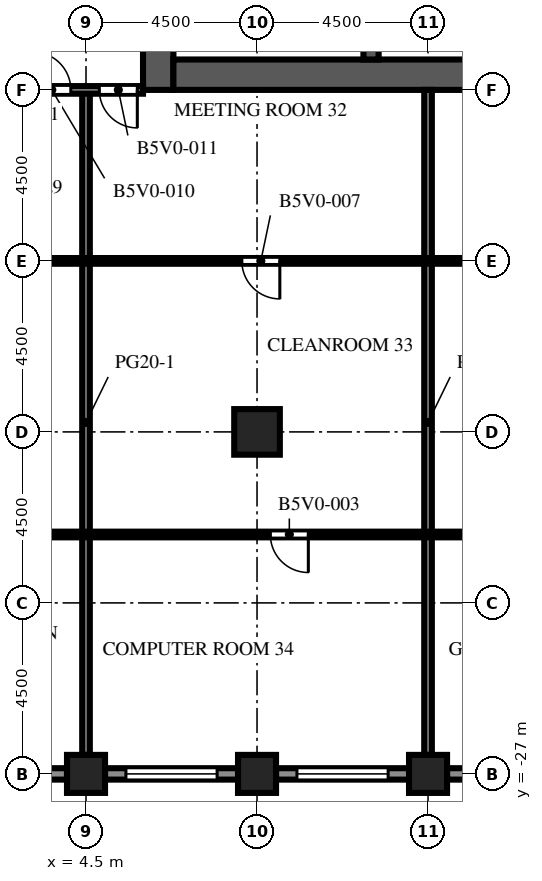
"""IFC4 building model, lengths in metres.
Left out: names, types, materials, properties, quantities, classifications, styles, units other than length and angle.
Written with IfcOpenShell. Run it as: python <this file> out.ifc"""

import sys

from ifc_helpers import new_model, si_unit, direction, frame, frame_2d, origin, origin_2d, place, context, subcontext, project, spatial, rectangle, extrude, element, fill, save


model = new_model("IFC4")
c1 = context("Model", 3, precision=1e-05, world=origin(), true_north=direction((0.0, 1.0)))
c2 = subcontext(c1, "Body", "Model", "MODEL_VIEW")
j1 = project(units=[si_unit("LENGTHUNIT", "METRE"), si_unit("PLANEANGLEUNIT", "RADIAN")], contexts=[c1])
p1 = place(None, origin())
s1 = spatial("IfcSite", under=j1, at=p1, CompositionType="ELEMENT")
p2 = place(p1, origin())
s2 = spatial("IfcBuilding", under=s1, at=p2, CompositionType="ELEMENT")
p3 = place(p2, frame((0.0, 0.0, 160.9)))
s3 = spatial("IfcBuildingStorey", under=s2, at=p3, CompositionType="ELEMENT", Elevation=160.9)
for number, where, z_axis, x_axis in (
    (1, (4.5, -27.0, 0.0), (0.0, 0.0, 1.0), (1.0, 0.0, 0.0)),
    (2, (9.0, -27.0, 0.0), (0.0, 0.0, 1.0), (1.0, 0.0, 0.0)),
    (3, (13.5, -27.0, 0.0), (0.0, 0.0, 1.0), (1.0, 0.0, 0.0)),
):
    element("IfcColumn", number, at=place(p3, frame(where, z_axis=z_axis, x_axis=x_axis)), inside=s3, PredefinedType="COLUMN", context=c2, shape_type="SweptSolid", body=[
        extrude(rectangle(XDim=1.0, YDim=1.0, at=origin_2d()), origin(), (0.0, 0.0, 1.0), 4.1),
    ])
p4 = place(p3, frame((9.0, -18.0, 0.0), z_axis=(0.0, 0.0, 1.0), x_axis=(1.0, 0.0, 0.0)))
e4 = element("IfcColumn", 4, at=p4, inside=s3, PredefinedType="COLUMN", context=c2, shape_type="SweptSolid", body=[
    extrude(rectangle(XDim=1.2, YDim=1.2, at=origin_2d()), origin(), (0.0, 0.0, 1.0), 4.1),
])
p5 = place(p3, frame((6.4, -9.0, 0.0), z_axis=(0.0, 0.0, 1.0), x_axis=(0.0, 1.0, 0.0)))
e5 = element("IfcWall", 5, at=p5, inside=s3, PredefinedType="SHEAR", context=c2, shape_type="SweptSolid", body=[
    extrude(rectangle(XDim=27.5, YDim=0.8, at=frame_2d((13.75, 0.0))), origin(), (0.0, 0.0, 1.0), 4.1),
])
p6 = place(p5, frame((12.55, 0.0, 0.0)))
e6 = element("IfcOpeningElement", 6, at=p6, cuts=e5, PredefinedType="OPENING", context=c2, shape_type="SweptSolid", body=[
    extrude(rectangle(XDim=2.4, YDim=2.4, at=frame_2d((1.2, 1.2))), frame((0.0, 0.41, 0.0), z_axis=(0.0, -1.0, 0.0), x_axis=(1.0, 0.0, 0.0)), (0.0, 0.0, 1.0), 0.82),
])
p7 = place(p5, frame((5.45, 0.0, 0.0)))
e7 = element("IfcOpeningElement", 7, at=p7, cuts=e5, PredefinedType="OPENING", context=c2, shape_type="SweptSolid", body=[
    extrude(rectangle(XDim=1.2, YDim=2.1, at=frame_2d((0.6, 1.05))), frame((0.0, 0.41, 0.0), z_axis=(0.0, -1.0, 0.0), x_axis=(1.0, 0.0, 0.0)), (0.0, 0.0, 1.0), 0.82),
])
p8 = place(p5, frame((19.45, 0.0, 0.0)))
e8 = element("IfcOpeningElement", 8, at=p8, cuts=e5, PredefinedType="OPENING", context=c2, shape_type="SweptSolid", body=[
    extrude(rectangle(XDim=1.0, YDim=2.1, at=frame_2d((0.5, 1.05))), frame((0.0, 0.41, 0.0), z_axis=(0.0, -1.0, 0.0), x_axis=(1.0, 0.0, 0.0)), (0.0, 0.0, 1.0), 0.82),
])
p9 = place(p5, frame((21.137, 0.0, 0.0)))
e9 = element("IfcOpeningElement", 9, at=p9, cuts=e5, PredefinedType="OPENING", context=c2, shape_type="SweptSolid", body=[
    extrude(rectangle(XDim=1.0, YDim=2.1, at=frame_2d((0.5, 1.05))), frame((0.0, 0.41, 0.0), z_axis=(0.0, -1.0, 0.0), x_axis=(1.0, 0.0, 0.0)), (0.0, 0.0, 1.0), 0.82),
])
p10 = place(p5, frame((23.2, 0.0, 0.0)))
e10 = element("IfcOpeningElement", 10, at=p10, cuts=e5, PredefinedType="OPENING", context=c2, shape_type="SweptSolid", body=[
    extrude(rectangle(XDim=1.0, YDim=2.1, at=frame_2d((0.5, 1.05))), frame((0.0, 0.41, 0.0), z_axis=(0.0, -1.0, 0.0), x_axis=(1.0, 0.0, 0.0)), (0.0, 0.0, 1.0), 0.82),
])
p11 = place(p5, frame((25.262, 0.0, 0.0)))
e11 = element("IfcOpeningElement", 11, at=p11, cuts=e5, PredefinedType="OPENING", context=c2, shape_type="SweptSolid", body=[
    extrude(rectangle(XDim=1.0, YDim=2.1, at=frame_2d((0.5, 1.05))), frame((0.0, 0.41, 0.0), z_axis=(0.0, -1.0, 0.0), x_axis=(1.0, 0.0, 0.0)), (0.0, 0.0, 1.0), 0.82),
])
p12 = place(p3, frame((6.8, -8.6, 0.0), z_axis=(0.0, 0.0, 1.0), x_axis=(1.0, 0.0, 0.0)))
e12 = element("IfcWall", 12, at=p12, inside=s3, PredefinedType="SHEAR", context=c2, shape_type="SweptSolid", body=[
    extrude(rectangle(XDim=10.4, YDim=0.8, at=frame_2d((5.2, 0.0))), origin(), (0.0, 0.0, 1.0), 4.1),
])
p13 = place(p3, frame((12.0, -8.2, 0.0), z_axis=(0.0, 0.0, 1.0), x_axis=(0.0, 1.0, 0.0)))
e13 = element("IfcWall", 13, at=p13, inside=s3, PredefinedType="SHEAR", context=c2, shape_type="SweptSolid", body=[
    extrude(rectangle(XDim=7.5, YDim=0.4, at=frame_2d((3.75, 0.0))), origin(), (0.0, 0.0, 1.0), 4.1),
])
p14 = place(p3, frame((4.0, -27.0, 0.0), z_axis=(0.0, 0.0, 1.0), x_axis=(-1.0, 0.0, 0.0)))
e14 = element("IfcWall", 14, at=p14, inside=s3, PredefinedType="SOLIDWALL", context=c2, shape_type="SweptSolid", body=[
    extrude(rectangle(XDim=3.5, YDim=0.3, at=frame_2d((1.75, 0.0))), origin(), (0.0, 0.0, 1.0), 2.85),
])
p15 = place(p14, frame((0.55, 0.0, 0.8)))
e15 = element("IfcOpeningElement", 15, at=p15, cuts=e14, PredefinedType="OPENING", context=c2, shape_type="SweptSolid", body=[
    extrude(rectangle(XDim=2.4, YDim=1.7, at=frame_2d((1.2, 0.85))), frame((0.0, 0.16, 0.0), z_axis=(0.0, -1.0, 0.0), x_axis=(1.0, 0.0, 0.0)), (0.0, 0.0, 1.0), 0.32),
])
p16 = place(p3, frame((8.5, -27.0, 0.0), z_axis=(0.0, 0.0, 1.0), x_axis=(-1.0, 0.0, 0.0)))
e16 = element("IfcWall", 16, at=p16, inside=s3, PredefinedType="SOLIDWALL", context=c2, shape_type="SweptSolid", body=[
    extrude(rectangle(XDim=3.5, YDim=0.3, at=frame_2d((1.75, 0.0))), origin(), (0.0, 0.0, 1.0), 2.85),
])
p17 = place(p16, frame((0.55, 0.0, 0.8)))
e17 = element("IfcOpeningElement", 17, at=p17, cuts=e16, PredefinedType="OPENING", context=c2, shape_type="SweptSolid", body=[
    extrude(rectangle(XDim=2.4, YDim=1.7, at=frame_2d((1.2, 0.85))), frame((0.0, 0.16, 0.0), z_axis=(0.0, -1.0, 0.0), x_axis=(1.0, 0.0, 0.0)), (0.0, 0.0, 1.0), 0.32),
])
p18 = place(p3, frame((13.0, -27.0, 0.0), z_axis=(0.0, 0.0, 1.0), x_axis=(-1.0, 0.0, 0.0)))
e18 = element("IfcWall", 18, at=p18, inside=s3, PredefinedType="SOLIDWALL", context=c2, shape_type="SweptSolid", body=[
    extrude(rectangle(XDim=3.5, YDim=0.3, at=frame_2d((1.75, 0.0))), origin(), (0.0, 0.0, 1.0), 2.85),
])
p19 = place(p18, frame((0.55, 0.0, 0.8)))
e19 = element("IfcOpeningElement", 19, at=p19, cuts=e18, PredefinedType="OPENING", context=c2, shape_type="SweptSolid", body=[
    extrude(rectangle(XDim=2.4, YDim=1.7, at=frame_2d((1.2, 0.85))), frame((0.0, 0.16, 0.0), z_axis=(0.0, -1.0, 0.0), x_axis=(1.0, 0.0, 0.0)), (0.0, 0.0, 1.0), 0.32),
])
p20 = place(p3, frame((17.5, -27.0, 0.0), z_axis=(0.0, 0.0, 1.0), x_axis=(-1.0, 0.0, 0.0)))
e20 = element("IfcWall", 20, at=p20, inside=s3, PredefinedType="SOLIDWALL", context=c2, shape_type="SweptSolid", body=[
    extrude(rectangle(XDim=3.5, YDim=0.3, at=frame_2d((1.75, 0.0))), origin(), (0.0, 0.0, 1.0), 2.85),
])
p21 = place(p20, frame((1.25, 0.0, 0.0)))
e21 = element("IfcOpeningElement", 21, at=p21, cuts=e20, PredefinedType="OPENING", context=c2, shape_type="SweptSolid", body=[
    extrude(rectangle(XDim=1.0, YDim=2.2, at=frame_2d((0.5, 1.1))), frame((0.0, 0.16, 0.0), z_axis=(0.0, -1.0, 0.0), x_axis=(1.0, 0.0, 0.0)), (0.0, 0.0, 1.0), 0.32),
])
for number, where, z_axis, x_axis in (
    (22, (4.5, -26.5, 0.0), (0.0, 0.0, 1.0), (0.0, 1.0, 0.0)),
    (23, (13.5, -26.5, 0.0), (0.0, 0.0, 1.0), (0.0, 1.0, 0.0)),
):
    element("IfcWall", number, at=place(p3, frame(where, z_axis=z_axis, x_axis=x_axis)), inside=s3, PredefinedType="PARTITIONING", context=c2, shape_type="SweptSolid", body=[
        extrude(rectangle(XDim=17.5, YDim=0.2, at=frame_2d((8.75, 0.0))), origin(), (0.0, 0.0, 1.0), 3.65),
    ])
p22 = place(p3, frame((21.0, -20.7, 0.0), z_axis=(0.0, 0.0, 1.0), x_axis=(-1.0, 0.0, 0.0)))
e24 = element("IfcWall", 24, at=p22, inside=s3, PredefinedType="PARTITIONING", context=c2, shape_type="SweptSolid", body=[
    extrude(rectangle(XDim=34.5, YDim=0.15, at=frame_2d((17.25, 0.0))), origin(), (0.0, 0.0, 1.0), 3.65),
])
p23 = place(p22, frame((26.15, 0.0, 0.0)))
e25 = element("IfcOpeningElement", 25, at=p23, cuts=e24, PredefinedType="OPENING", context=c2, shape_type="SweptSolid", body=[
    extrude(rectangle(XDim=1.0, YDim=2.1, at=frame_2d((0.5, 1.05))), frame((0.0, 0.085, 0.0), z_axis=(0.0, -1.0, 0.0), x_axis=(1.0, 0.0, 0.0)), (0.0, 0.0, 1.0), 0.17),
])
p24 = place(p22, frame((18.65, 0.0, 0.0)))
e26 = element("IfcOpeningElement", 26, at=p24, cuts=e24, PredefinedType="OPENING", context=c2, shape_type="SweptSolid", body=[
    extrude(rectangle(XDim=1.0, YDim=2.1, at=frame_2d((0.5, 1.05))), frame((0.0, 0.085, 0.0), z_axis=(0.0, -1.0, 0.0), x_axis=(1.0, 0.0, 0.0)), (0.0, 0.0, 1.0), 0.17),
])
p25 = place(p22, frame((10.65, 0.0, 0.0)))
e27 = element("IfcOpeningElement", 27, at=p25, cuts=e24, PredefinedType="OPENING", context=c2, shape_type="SweptSolid", body=[
    extrude(rectangle(XDim=1.0, YDim=2.1, at=frame_2d((0.5, 1.05))), frame((0.0, 0.085, 0.0), z_axis=(0.0, -1.0, 0.0), x_axis=(1.0, 0.0, 0.0)), (0.0, 0.0, 1.0), 0.17),
])
p26 = place(p22, frame((4.15, 0.0, 0.0)))
e28 = element("IfcOpeningElement", 28, at=p26, cuts=e24, PredefinedType="OPENING", context=c2, shape_type="SweptSolid", body=[
    extrude(rectangle(XDim=1.0, YDim=2.1, at=frame_2d((0.5, 1.05))), frame((0.0, 0.085, 0.0), z_axis=(0.0, -1.0, 0.0), x_axis=(1.0, 0.0, 0.0)), (0.0, 0.0, 1.0), 0.17),
])
p27 = place(p3, frame((21.0, -13.5, 0.0), z_axis=(0.0, 0.0, 1.0), x_axis=(-1.0, 0.0, 0.0)))
e29 = element("IfcWall", 29, at=p27, inside=s3, PredefinedType="PARTITIONING", context=c2, shape_type="SweptSolid", body=[
    extrude(rectangle(XDim=34.5, YDim=0.15, at=frame_2d((17.25, 0.0))), origin(), (0.0, 0.0, 1.0), 3.65),
])
p28 = place(p27, frame((26.15, 0.0, 0.0)))
e30 = element("IfcOpeningElement", 30, at=p28, cuts=e29, PredefinedType="OPENING", context=c2, shape_type="SweptSolid", body=[
    extrude(rectangle(XDim=1.0, YDim=2.1, at=frame_2d((0.5, 1.05))), frame((0.0, 0.085, 0.0), z_axis=(0.0, -1.0, 0.0), x_axis=(1.0, 0.0, 0.0)), (0.0, 0.0, 1.0), 0.17),
])
p29 = place(p27, frame((18.65, 0.0, 0.0)))
e31 = element("IfcOpeningElement", 31, at=p29, cuts=e29, PredefinedType="OPENING", context=c2, shape_type="SweptSolid", body=[
    extrude(rectangle(XDim=1.0, YDim=2.1, at=frame_2d((0.5, 1.05))), frame((0.0, 0.085, 0.0), z_axis=(0.0, -1.0, 0.0), x_axis=(1.0, 0.0, 0.0)), (0.0, 0.0, 1.0), 0.17),
])
p30 = place(p27, frame((11.4, 0.0, 0.0)))
e32 = element("IfcOpeningElement", 32, at=p30, cuts=e29, PredefinedType="OPENING", context=c2, shape_type="SweptSolid", body=[
    extrude(rectangle(XDim=1.0, YDim=2.1, at=frame_2d((0.5, 1.05))), frame((0.0, 0.085, 0.0), z_axis=(0.0, -1.0, 0.0), x_axis=(1.0, 0.0, 0.0)), (0.0, 0.0, 1.0), 0.17),
])
p31 = place(p27, frame((3.15, 0.0, 0.0)))
e33 = element("IfcOpeningElement", 33, at=p31, cuts=e29, PredefinedType="OPENING", context=c2, shape_type="SweptSolid", body=[
    extrude(rectangle(XDim=1.0, YDim=2.1, at=frame_2d((0.5, 1.05))), frame((0.0, 0.085, 0.0), z_axis=(0.0, -1.0, 0.0), x_axis=(1.0, 0.0, 0.0)), (0.0, 0.0, 1.0), 0.17),
])
p32 = place(p3, frame((6.0, -9.0, 0.0), z_axis=(0.0, 0.0, 1.0), x_axis=(-1.0, 0.0, 0.0)))
e34 = element("IfcWall", 34, at=p32, inside=s3, PredefinedType="PARTITIONING", context=c2, shape_type="SweptSolid", body=[
    extrude(rectangle(XDim=4.5, YDim=0.2, at=frame_2d((2.25, 0.0))), origin(), (0.0, 0.0, 1.0), 3.65),
])
p33 = place(p32, frame((1.9, 0.0, 0.0)))
e35 = element("IfcOpeningElement", 35, at=p33, cuts=e34, PredefinedType="OPENING", context=c2, shape_type="SweptSolid", body=[
    extrude(rectangle(XDim=1.0, YDim=2.1, at=frame_2d((0.5, 1.05))), frame((0.0, 0.11, 0.0), z_axis=(0.0, -1.0, 0.0), x_axis=(1.0, 0.0, 0.0)), (0.0, 0.0, 1.0), 0.22),
])
p34 = place(p32, frame((0.15, 0.0, 0.0)))
e36 = element("IfcOpeningElement", 36, at=p34, cuts=e34, PredefinedType="OPENING", context=c2, shape_type="SweptSolid", body=[
    extrude(rectangle(XDim=1.0, YDim=2.1, at=frame_2d((0.5, 1.05))), frame((0.0, 0.11, 0.0), z_axis=(0.0, -1.0, 0.0), x_axis=(1.0, 0.0, 0.0)), (0.0, 0.0, 1.0), 0.22),
])
p35 = place(p17, origin())
e37 = element("IfcWindow", 37, at=p35, inside=s3, PartitioningType="SINGLE_PANEL", PredefinedType="WINDOW", context=c2, shape_type="SweptSolid", body=[
    extrude(rectangle(XDim=2.4, YDim=1.7, at=frame_2d((1.2, 0.85))), frame((0.0, 0.03, 0.0), z_axis=(0.0, -1.0, 0.0), x_axis=(1.0, 0.0, 0.0)), (0.0, 0.0, 1.0), 0.06),
])
fill(e17, e37)
p36 = place(p19, origin())
e38 = element("IfcWindow", 38, at=p36, inside=s3, PartitioningType="SINGLE_PANEL", PredefinedType="WINDOW", context=c2, shape_type="SweptSolid", body=[
    extrude(rectangle(XDim=2.4, YDim=1.7, at=frame_2d((1.2, 0.85))), frame((0.0, 0.03, 0.0), z_axis=(0.0, -1.0, 0.0), x_axis=(1.0, 0.0, 0.0)), (0.0, 0.0, 1.0), 0.06),
])
fill(e19, e38)
p37 = place(p25, origin())
e39 = element("IfcDoor", 39, at=p37, inside=s3, OperationType="SINGLE_SWING_LEFT", PredefinedType="DOOR", context=c2, shape_type="SweptSolid", body=[
    extrude(rectangle(XDim=1.0, YDim=2.1, at=frame_2d((0.5, 1.05))), frame((0.0, 0.025, 0.0), z_axis=(0.0, -1.0, 0.0), x_axis=(1.0, 0.0, 0.0)), (0.0, 0.0, 1.0), 0.05),
])
fill(e27, e39)
p38 = place(p30, origin())
e40 = element("IfcDoor", 40, at=p38, inside=s3, OperationType="SINGLE_SWING_LEFT", PredefinedType="DOOR", context=c2, shape_type="SweptSolid", body=[
    extrude(rectangle(XDim=1.0, YDim=2.1, at=frame_2d((0.5, 1.05))), frame((0.0, 0.025, 0.0), z_axis=(0.0, -1.0, 0.0), x_axis=(1.0, 0.0, 0.0)), (0.0, 0.0, 1.0), 0.05),
])
fill(e32, e40)
p39 = place(p33, origin())
e41 = element("IfcDoor", 41, at=p39, inside=s3, OperationType="SINGLE_SWING_RIGHT", PredefinedType="DOOR", context=c2, shape_type="SweptSolid", body=[
    extrude(rectangle(XDim=1.0, YDim=2.1, at=frame_2d((0.5, 1.05))), frame((0.0, 0.025, 0.0), z_axis=(0.0, -1.0, 0.0), x_axis=(1.0, 0.0, 0.0)), (0.0, 0.0, 1.0), 0.05),
])
fill(e35, e41)
p40 = place(p34, origin())
e42 = element("IfcDoor", 42, at=p40, inside=s3, OperationType="SINGLE_SWING_LEFT", PredefinedType="DOOR", context=c2, shape_type="SweptSolid", body=[
    extrude(rectangle(XDim=1.0, YDim=2.1, at=frame_2d((0.5, 1.05))), frame((0.0, 0.025, 0.0), z_axis=(0.0, -1.0, 0.0), x_axis=(1.0, 0.0, 0.0)), (0.0, 0.0, 1.0), 0.05),
])
fill(e36, e42)
save(model, sys.argv[1])
